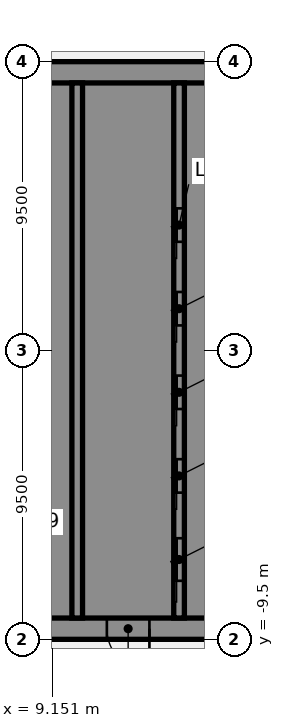
"""IFC4 building model, lengths in metres.
Left out: names, types, materials, properties, quantities, classifications, styles, units other than length and angle.
Written with IfcOpenShell. Run it as: python <this file> out.ifc"""

import sys

from ifc_helpers import new_model, si_unit, direction, frame, frame_2d, origin, place, context, subcontext, project, spatial, polyline, rectangle, outline, extrude, element, fill, save


model = new_model("IFC4")
c1 = context("Model", 3, precision=1e-05, world=origin(), true_north=direction((0.0, 1.0)))
c2 = subcontext(c1, "Body", "Model", "MODEL_VIEW")
j1 = project(units=[si_unit("LENGTHUNIT", "METRE"), si_unit("PLANEANGLEUNIT", "RADIAN")], contexts=[c1])
p1 = place(None, origin())
s1 = spatial("IfcSite", under=j1, at=p1, CompositionType="ELEMENT")
p2 = place(p1, origin())
s2 = spatial("IfcBuilding", under=s1, at=p2, CompositionType="ELEMENT")
p3 = place(p2, frame((0.0, 0.0, -21.0)))
s3 = spatial("IfcBuildingStorey", under=s2, at=p3, CompositionType="ELEMENT", Elevation=-21.0)
p4 = place(p3, frame((16.5, -9.15, 0.0), z_axis=(0.0, 0.0, 1.0), x_axis=(-1.0, 0.0, 0.0)))
e1 = element("IfcWall", 1, at=p4, inside=s3, PredefinedType="SHEAR", context=c2, shape_type="SweptSolid", body=[
    extrude(rectangle(XDim=13.0, YDim=0.7, at=frame_2d((6.5, 0.0))), origin(), (0.0, 0.0, 1.0), 6.55),
])
p5 = place(p4, frame((4.15, 0.0, 0.0)))
e2 = element("IfcOpeningElement", 2, at=p5, cuts=e1, PredefinedType="OPENING", context=c2, shape_type="SweptSolid", body=[
    extrude(rectangle(XDim=1.4, YDim=2.1, at=frame_2d((0.7, 1.05))), frame((0.0, 0.36, 0.0), z_axis=(0.0, -1.0, 0.0), x_axis=(1.0, 0.0, 0.0)), (0.0, 0.0, 1.0), 0.72),
])
p6 = place(p4, frame((10.125, 0.0, 0.0)))
e3 = element("IfcOpeningElement", 3, at=p6, cuts=e1, PredefinedType="OPENING", context=c2, shape_type="SweptSolid", body=[
    extrude(rectangle(XDim=1.4, YDim=2.1, at=frame_2d((0.7, 1.05))), frame((0.0, 0.36, 0.0), z_axis=(0.0, -1.0, 0.0), x_axis=(1.0, 0.0, 0.0)), (0.0, 0.0, 1.0), 0.72),
])
p7 = place(p3, origin())
e4 = element("IfcWall", 4, at=p7, inside=s3, PredefinedType="SHEAR", context=c2, shape_type="SweptSolid", body=[
    extrude(outline(polyline([(13.5, -8.8), (15.8, -8.8), (16.5, -8.8), (16.5, 8.8), (15.8, 8.8), (13.5, 8.8), (13.5, 8.125), (15.8, 8.125), (15.8, 5.625), (13.5, 5.625), (13.5, 5.375), (15.8, 5.375), (15.8, 2.875), (13.5, 2.875), (13.5, 2.625), (15.8, 2.625), (15.8, 0.125), (13.5, 0.125), (13.5, -0.125), (15.8, -0.125), (15.8, -2.625), (13.5, -2.625), (13.5, -2.875), (15.8, -2.875), (15.8, -5.375), (13.5, -5.375), (13.5, -5.625), (15.8, -5.625), (15.8, -8.125), (13.5, -8.125), (13.5, -8.8)])), origin(), (0.0, 0.0, 1.0), 6.55),
])
p8 = place(p3, frame((16.5, 9.15, 0.0), z_axis=(0.0, 0.0, 1.0), x_axis=(-1.0, 0.0, 0.0)))
e5 = element("IfcWall", 5, at=p8, inside=s3, PredefinedType="SHEAR", context=c2, shape_type="SweptSolid", body=[
    extrude(rectangle(XDim=13.0, YDim=0.7, at=frame_2d((6.5, 0.0))), origin(), (0.0, 0.0, 1.0), 6.55),
])
p9 = place(p3, origin())
e6 = element("IfcWall", 6, at=p9, inside=s3, PredefinedType="SHEAR", context=c2, shape_type="SweptSolid", body=[
    extrude(outline(polyline([(9.8, -5.375), (7.5, -5.375), (7.5, -2.875), (9.8, -2.875), (9.8, -2.625), (7.5, -2.625), (7.5, -0.125), (9.8, -0.125), (9.8, 0.125), (7.5, 0.125), (7.5, 2.625), (9.8, 2.625), (9.8, 2.875), (7.5, 2.875), (7.5, 5.375), (9.8, 5.375), (9.8, 5.625), (7.5, 5.625), (7.5, 8.125), (9.8, 8.125), (9.8, 8.8), (7.5, 8.8), (7.15, 8.8), (7.15, -5.625), (7.5, -5.625), (9.8, -5.625), (9.8, -5.375)])), origin(), (0.0, 0.0, 1.0), 6.55),
])
p10 = place(p3, origin())
e7 = element("IfcWall", 7, at=p10, inside=s3, PredefinedType="SHEAR", context=c2, shape_type="SweptSolid", body=[
    extrude(outline(polyline([(7.5, -8.125), (7.5, -8.8), (9.8, -8.8), (9.8, -8.125), (9.8, -5.625), (9.55, -5.625), (9.55, -8.125), (7.5, -8.125)])), origin(), (0.0, 0.0, 1.0), 6.55),
])
p11 = place(p3, frame((13.325, -8.8, 0.0), z_axis=(0.0, 0.0, 1.0), x_axis=(0.0, 1.0, 0.0)))
e8 = element("IfcWall", 8, at=p11, inside=s3, PredefinedType="SHEAR", context=c2, shape_type="SweptSolid", body=[
    extrude(rectangle(XDim=17.6, YDim=0.35, at=frame_2d((8.8, 0.0))), origin(), (0.0, 0.0, 1.0), 6.55),
])
p12 = place(p11, frame((1.225, 0.0, 0.0)))
e9 = element("IfcOpeningElement", 9, at=p12, cuts=e8, PredefinedType="OPENING", context=c2, shape_type="SweptSolid", body=[
    extrude(rectangle(XDim=1.4, YDim=2.1, at=frame_2d((0.7, 1.05))), frame((0.0, 0.185, 0.0), z_axis=(0.0, -1.0, 0.0), x_axis=(1.0, 0.0, 0.0)), (0.0, 0.0, 1.0), 0.37),
])
p13 = place(p11, frame((4.125, 0.0, 0.0)))
e10 = element("IfcOpeningElement", 10, at=p13, cuts=e8, PredefinedType="OPENING", context=c2, shape_type="SweptSolid", body=[
    extrude(rectangle(XDim=1.1, YDim=2.1, at=frame_2d((0.55, 1.05))), frame((0.0, 0.185, 0.0), z_axis=(0.0, -1.0, 0.0), x_axis=(1.0, 0.0, 0.0)), (0.0, 0.0, 1.0), 0.37),
])
p14 = place(p11, frame((6.875, 0.0, 0.0)))
e11 = element("IfcOpeningElement", 11, at=p14, cuts=e8, PredefinedType="OPENING", context=c2, shape_type="SweptSolid", body=[
    extrude(rectangle(XDim=1.1, YDim=2.1, at=frame_2d((0.55, 1.05))), frame((0.0, 0.185, 0.0), z_axis=(0.0, -1.0, 0.0), x_axis=(1.0, 0.0, 0.0)), (0.0, 0.0, 1.0), 0.37),
])
p15 = place(p11, frame((9.625, 0.0, 0.0)))
e12 = element("IfcOpeningElement", 12, at=p15, cuts=e8, PredefinedType="OPENING", context=c2, shape_type="SweptSolid", body=[
    extrude(rectangle(XDim=1.1, YDim=2.1, at=frame_2d((0.55, 1.05))), frame((0.0, 0.185, 0.0), z_axis=(0.0, -1.0, 0.0), x_axis=(1.0, 0.0, 0.0)), (0.0, 0.0, 1.0), 0.37),
])
p16 = place(p11, frame((12.375, 0.0, 0.0)))
e13 = element("IfcOpeningElement", 13, at=p16, cuts=e8, PredefinedType="OPENING", context=c2, shape_type="SweptSolid", body=[
    extrude(rectangle(XDim=1.1, YDim=2.1, at=frame_2d((0.55, 1.05))), frame((0.0, 0.185, 0.0), z_axis=(0.0, -1.0, 0.0), x_axis=(1.0, 0.0, 0.0)), (0.0, 0.0, 1.0), 0.37),
])
p17 = place(p3, frame((9.975, -8.8, 0.0), z_axis=(0.0, 0.0, 1.0), x_axis=(0.0, 1.0, 0.0)))
e14 = element("IfcWall", 14, at=p17, inside=s3, PredefinedType="SHEAR", context=c2, shape_type="SweptSolid", body=[
    extrude(rectangle(XDim=17.6, YDim=0.35, at=frame_2d((8.8, 0.0))), origin(), (0.0, 0.0, 1.0), 6.55),
])
p18 = place(p5, origin())
e15 = element("IfcDoor", 15, at=p18, inside=s3, OperationType="SINGLE_SWING_LEFT", PredefinedType="DOOR", context=c2, shape_type="SweptSolid", body=[
    extrude(rectangle(XDim=1.4, YDim=2.1, at=frame_2d((0.7, 1.05))), frame((0.0, 0.025, 0.0), z_axis=(0.0, -1.0, 0.0), x_axis=(1.0, 0.0, 0.0)), (0.0, 0.0, 1.0), 0.05),
])
fill(e2, e15)
p19 = place(p12, origin())
e16 = element("IfcDoor", 16, at=p19, inside=s3, OperationType="SLIDING_TO_LEFT", PredefinedType="DOOR", context=c2, shape_type="SweptSolid", body=[
    extrude(rectangle(XDim=1.4, YDim=2.1, at=frame_2d((0.7, 1.05))), frame((0.0, 0.025, 0.0), z_axis=(0.0, -1.0, 0.0), x_axis=(1.0, 0.0, 0.0)), (0.0, 0.0, 1.0), 0.05),
])
fill(e9, e16)
p20 = place(p13, origin())
e17 = element("IfcDoor", 17, at=p20, inside=s3, OperationType="SLIDING_TO_LEFT", PredefinedType="DOOR", context=c2, shape_type="SweptSolid", body=[
    extrude(rectangle(XDim=1.1, YDim=2.1, at=frame_2d((0.55, 1.05))), frame((0.0, 0.025, 0.0), z_axis=(0.0, -1.0, 0.0), x_axis=(1.0, 0.0, 0.0)), (0.0, 0.0, 1.0), 0.05),
])
fill(e10, e17)
p21 = place(p14, origin())
e18 = element("IfcDoor", 18, at=p21, inside=s3, OperationType="SLIDING_TO_LEFT", PredefinedType="DOOR", context=c2, shape_type="SweptSolid", body=[
    extrude(rectangle(XDim=1.1, YDim=2.1, at=frame_2d((0.55, 1.05))), frame((0.0, 0.025, 0.0), z_axis=(0.0, -1.0, 0.0), x_axis=(1.0, 0.0, 0.0)), (0.0, 0.0, 1.0), 0.05),
])
fill(e11, e18)
p22 = place(p15, origin())
e19 = element("IfcDoor", 19, at=p22, inside=s3, OperationType="SLIDING_TO_LEFT", PredefinedType="DOOR", context=c2, shape_type="SweptSolid", body=[
    extrude(rectangle(XDim=1.1, YDim=2.1, at=frame_2d((0.55, 1.05))), frame((0.0, 0.025, 0.0), z_axis=(0.0, -1.0, 0.0), x_axis=(1.0, 0.0, 0.0)), (0.0, 0.0, 1.0), 0.05),
])
fill(e12, e19)
p23 = place(p16, origin())
e20 = element("IfcDoor", 20, at=p23, inside=s3, OperationType="SLIDING_TO_LEFT", PredefinedType="DOOR", context=c2, shape_type="SweptSolid", body=[
    extrude(rectangle(XDim=1.1, YDim=2.1, at=frame_2d((0.55, 1.05))), frame((0.0, 0.025, 0.0), z_axis=(0.0, -1.0, 0.0), x_axis=(1.0, 0.0, 0.0)), (0.0, 0.0, 1.0), 0.05),
])
fill(e13, e20)
save(model, sys.argv[1])
